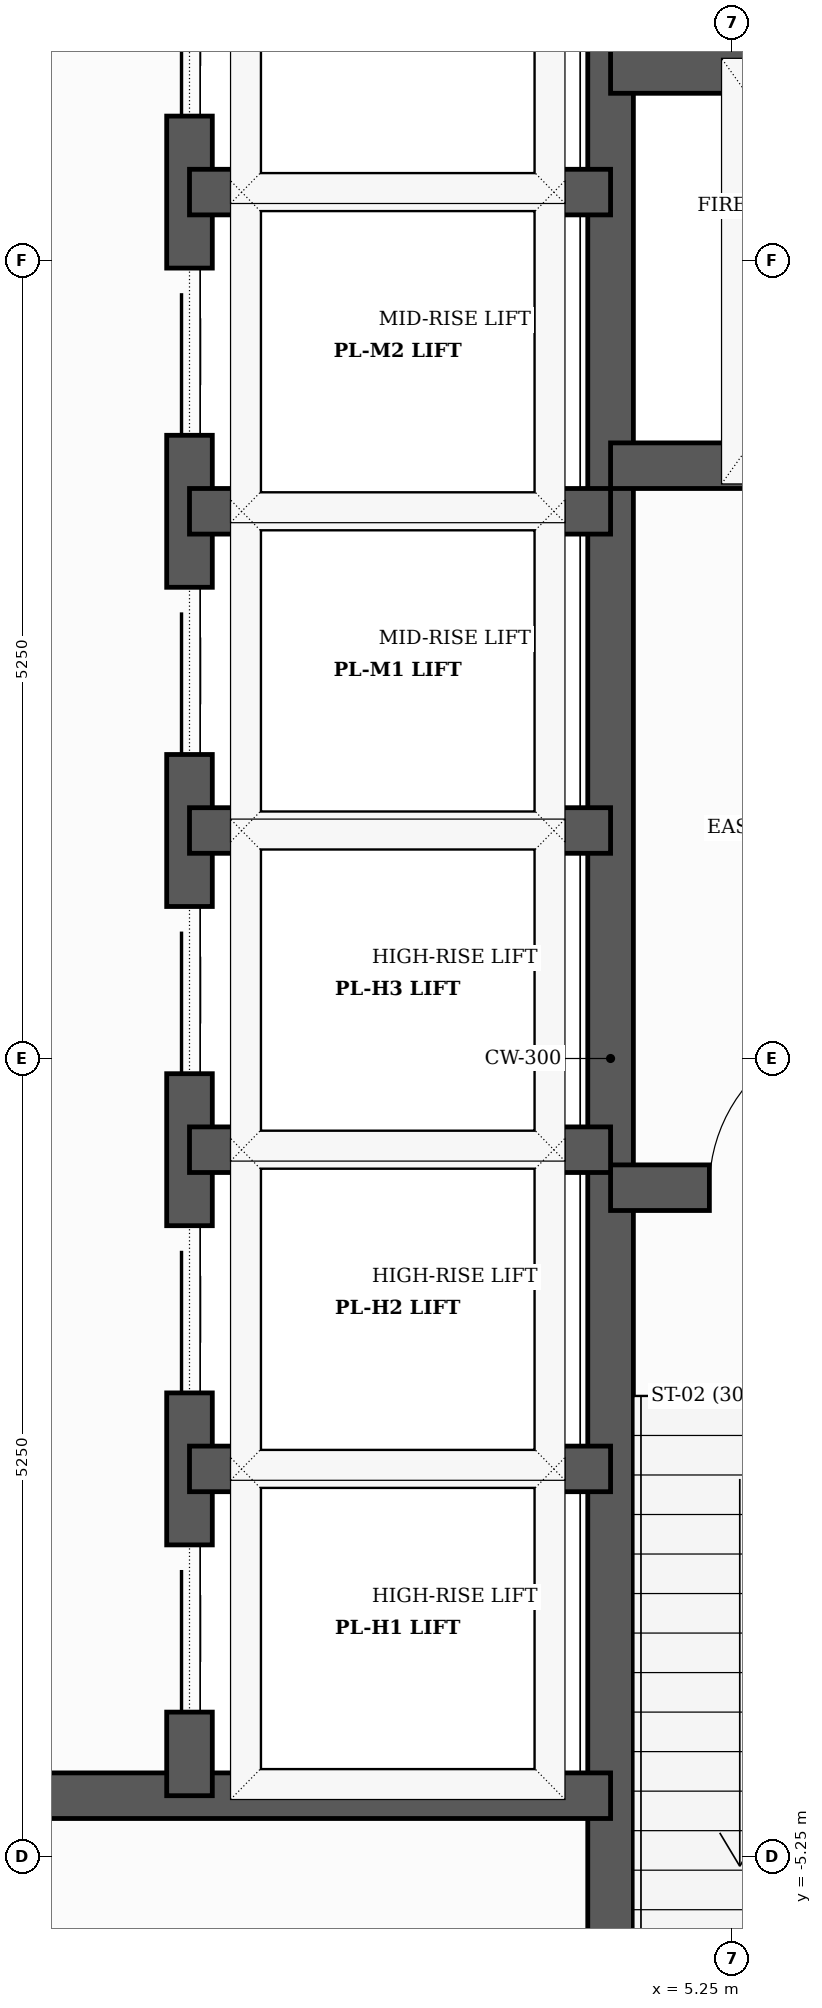
"""IFC4 building model, lengths in metres.
Left out: names, types, materials, properties, quantities, classifications, styles, units other than length and angle.
Written with IfcOpenShell. Run it as: python <this file> out.ifc"""

import sys

from ifc_helpers import new_model, si_unit, direction, frame, frame_2d, origin, place, context, subcontext, project, spatial, rectangle, extrude, element, fill, save


model = new_model("IFC4")
c1 = context("Model", 3, precision=1e-05, world=origin(), true_north=direction((0.0, 1.0)))
c2 = subcontext(c1, "Body", "Model", "MODEL_VIEW")
j1 = project(units=[si_unit("LENGTHUNIT", "METRE"), si_unit("PLANEANGLEUNIT", "RADIAN")], contexts=[c1])
p1 = place(None, origin())
s1 = spatial("IfcSite", under=j1, at=p1, CompositionType="ELEMENT")
p2 = place(p1, origin())
s2 = spatial("IfcBuilding", under=s1, at=p2, CompositionType="ELEMENT")
p3 = place(p2, frame((0.0, 0.0, 85.2)))
s3 = spatial("IfcBuildingStorey", under=s2, at=p3, CompositionType="ELEMENT", Elevation=85.2)
p4 = place(p3, frame((30.436, -3.14, 0.0), z_axis=(0.0, 0.0, 1.0), x_axis=(-0.743144101168, 0.669131410785, 0.0)))
e1 = element("IfcWall", 1, at=p4, inside=s3, PredefinedType="SOLIDWALL", context=c2, shape_type="SweptSolid", body=[
    extrude(rectangle(XDim=49.44, YDim=0.22, at=frame_2d((24.72, 0.0))), origin(), (0.0, 0.0, 1.0), 4.4),
])
p5 = place(p3, frame((4.45, -7.79, 0.0), z_axis=(0.0, 0.0, 1.0), x_axis=(0.0, 1.0, 0.0)))
e2 = element("IfcWall", 2, at=p5, inside=s3, PredefinedType="SHEAR", context=c2, shape_type="SweptSolid", body=[
    extrude(rectangle(XDim=15.58, YDim=0.3, at=frame_2d((7.79, 0.0))), origin(), (0.0, 0.0, 1.0), 4.9),
])
p6 = place(p3, frame((4.45, -0.85, 0.0), z_axis=(0.0, 0.0, 1.0), x_axis=(1.0, 0.0, 0.0)))
e3 = element("IfcWall", 3, at=p6, inside=s3, PredefinedType="SHEAR", context=c2, shape_type="SweptSolid", body=[
    extrude(rectangle(XDim=3.34, YDim=0.3, at=frame_2d((1.67, 0.0))), origin(), (0.0, 0.0, 1.0), 4.9),
])
p7 = place(p6, frame((0.65, 0.0, 0.0)))
e4 = element("IfcOpeningElement", 4, at=p7, cuts=e3, PredefinedType="OPENING", context=c2, shape_type="SweptSolid", body=[
    extrude(rectangle(XDim=1.05, YDim=2.15, at=frame_2d((0.525, 1.075))), frame((0.0, 0.16, 0.0), z_axis=(0.0, -1.0, 0.0), x_axis=(1.0, 0.0, 0.0)), (0.0, 0.0, 1.0), 0.32),
])
p8 = place(p3, frame((4.45, 3.9, 0.0), z_axis=(0.0, 0.0, 1.0), x_axis=(1.0, 0.0, 0.0)))
e5 = element("IfcWall", 5, at=p8, inside=s3, PredefinedType="SHEAR", context=c2, shape_type="SweptSolid", body=[
    extrude(rectangle(XDim=3.34, YDim=0.3, at=frame_2d((1.67, 0.0))), origin(), (0.0, 0.0, 1.0), 4.9),
])
p9 = place(p8, frame((1.18, 0.0, 0.0)))
e6 = element("IfcOpeningElement", 6, at=p9, cuts=e5, PredefinedType="OPENING", context=c2, shape_type="SweptSolid", body=[
    extrude(rectangle(XDim=1.1, YDim=2.1, at=frame_2d((0.55, 1.05))), frame((0.0, 0.16, 0.0), z_axis=(0.0, -1.0, 0.0), x_axis=(1.0, 0.0, 0.0)), (0.0, 0.0, 1.0), 0.32),
])
p10 = place(p3, frame((4.45, 6.5, 0.0), z_axis=(0.0, 0.0, 1.0), x_axis=(1.0, 0.0, 0.0)))
e7 = element("IfcWall", 7, at=p10, inside=s3, PredefinedType="SHEAR", context=c2, shape_type="SweptSolid", body=[
    extrude(rectangle(XDim=3.34, YDim=0.3, at=frame_2d((1.67, 0.0))), origin(), (0.0, 0.0, 1.0), 4.9),
])
p11 = place(p3, frame((-4.45, -4.85, 0.0), z_axis=(0.0, 0.0, 1.0), x_axis=(1.0, 0.0, 0.0)))
e8 = element("IfcWall", 8, at=p11, inside=s3, PredefinedType="SHEAR", context=c2, shape_type="SweptSolid", body=[
    extrude(rectangle(XDim=8.9, YDim=0.3, at=frame_2d((4.45, 0.0))), origin(), (0.0, 0.0, 1.0), 4.9),
])
p12 = place(p3, frame((1.68, -4.85, 0.0), z_axis=(0.0, 0.0, 1.0), x_axis=(0.0, 1.0, 0.0)))
e9 = element("IfcWall", 9, at=p12, inside=s3, PredefinedType="SHEAR", context=c2, shape_type="SweptSolid", body=[
    extrude(rectangle(XDim=12.64, YDim=0.3, at=frame_2d((6.32, 0.0))), origin(), (0.0, 0.0, 1.0), 4.9),
])
p13 = place(p12, frame((0.55, 0.0, 0.0)))
e10 = element("IfcOpeningElement", 10, at=p13, cuts=e9, PredefinedType="OPENING", context=c2, shape_type="SweptSolid", body=[
    extrude(rectangle(XDim=1.1, YDim=2.1, at=frame_2d((0.55, 1.05))), frame((0.0, 0.16, 0.0), z_axis=(0.0, -1.0, 0.0), x_axis=(1.0, 0.0, 0.0)), (0.0, 0.0, 1.0), 0.32),
])
p14 = place(p12, frame((2.65, 0.0, 0.0)))
e11 = element("IfcOpeningElement", 11, at=p14, cuts=e9, PredefinedType="OPENING", context=c2, shape_type="SweptSolid", body=[
    extrude(rectangle(XDim=1.1, YDim=2.1, at=frame_2d((0.55, 1.05))), frame((0.0, 0.16, 0.0), z_axis=(0.0, -1.0, 0.0), x_axis=(1.0, 0.0, 0.0)), (0.0, 0.0, 1.0), 0.32),
])
p15 = place(p12, frame((4.75, 0.0, 0.0)))
e12 = element("IfcOpeningElement", 12, at=p15, cuts=e9, PredefinedType="OPENING", context=c2, shape_type="SweptSolid", body=[
    extrude(rectangle(XDim=1.1, YDim=2.1, at=frame_2d((0.55, 1.05))), frame((0.0, 0.16, 0.0), z_axis=(0.0, -1.0, 0.0), x_axis=(1.0, 0.0, 0.0)), (0.0, 0.0, 1.0), 0.32),
])
p16 = place(p12, frame((6.85, 0.0, 0.0)))
e13 = element("IfcOpeningElement", 13, at=p16, cuts=e9, PredefinedType="OPENING", context=c2, shape_type="SweptSolid", body=[
    extrude(rectangle(XDim=1.1, YDim=2.1, at=frame_2d((0.55, 1.05))), frame((0.0, 0.16, 0.0), z_axis=(0.0, -1.0, 0.0), x_axis=(1.0, 0.0, 0.0)), (0.0, 0.0, 1.0), 0.32),
])
p17 = place(p12, frame((8.95, 0.0, 0.0)))
e14 = element("IfcOpeningElement", 14, at=p17, cuts=e9, PredefinedType="OPENING", context=c2, shape_type="SweptSolid", body=[
    extrude(rectangle(XDim=1.1, YDim=2.1, at=frame_2d((0.55, 1.05))), frame((0.0, 0.16, 0.0), z_axis=(0.0, -1.0, 0.0), x_axis=(1.0, 0.0, 0.0)), (0.0, 0.0, 1.0), 0.32),
])
p18 = place(p12, frame((11.05, 0.0, 0.0)))
e15 = element("IfcOpeningElement", 15, at=p18, cuts=e9, PredefinedType="OPENING", context=c2, shape_type="SweptSolid", body=[
    extrude(rectangle(XDim=1.1, YDim=2.1, at=frame_2d((0.55, 1.05))), frame((0.0, 0.16, 0.0), z_axis=(0.0, -1.0, 0.0), x_axis=(1.0, 0.0, 0.0)), (0.0, 0.0, 1.0), 0.32),
])
for number, where, z_axis, x_axis in (
    (16, (1.68, 1.5, 0.0), (0.0, 0.0, 1.0), (1.0, 0.0, 0.0)),
    (17, (1.68, 3.6, 0.0), (0.0, 0.0, 1.0), (1.0, 0.0, 0.0)),
    (18, (1.68, 5.7, 0.0), (0.0, 0.0, 1.0), (1.0, 0.0, 0.0)),
    (19, (1.68, -2.7, 0.0), (0.0, 0.0, 1.0), (1.0, 0.0, 0.0)),
    (20, (1.68, -0.6, 0.0), (0.0, 0.0, 1.0), (1.0, 0.0, 0.0)),
):
    element("IfcWall", number, at=place(p3, frame(where, z_axis=z_axis, x_axis=x_axis)), inside=s3, PredefinedType="SHEAR", context=c2, shape_type="SweptSolid", body=[
        extrude(rectangle(XDim=2.77, YDim=0.3, at=frame_2d((1.385, 0.0))), origin(), (0.0, 0.0, 1.0), 4.9),
    ])
p19 = place(p3, frame((-7.036, 28.85, 0.0), z_axis=(0.0, 0.0, 1.0), x_axis=(0.743144937383, -0.669130482075, 0.0)))
e21 = element("IfcWall", 21, at=p19, inside=s3, PredefinedType="SOLIDWALL", context=c2, shape_type="SweptSolid", body=[
    extrude(rectangle(XDim=49.066, YDim=0.16, at=frame_2d((24.533, 0.0))), origin(), (0.0, 0.0, 1.0), 3.485),
])
p20 = place(p7, origin())
e22 = element("IfcDoor", 22, at=p20, inside=s3, OperationType="SINGLE_SWING_RIGHT", PredefinedType="DOOR", context=c2, shape_type="SweptSolid", body=[
    extrude(rectangle(XDim=1.05, YDim=2.15, at=frame_2d((0.525, 1.075))), frame((0.0, 0.025, 0.0), z_axis=(0.0, -1.0, 0.0), x_axis=(1.0, 0.0, 0.0)), (0.0, 0.0, 1.0), 0.05),
])
fill(e4, e22)
p21 = place(p13, origin())
e23 = element("IfcDoor", 23, at=p21, inside=s3, OperationType="SLIDING_TO_LEFT", PredefinedType="DOOR", context=c2, shape_type="SweptSolid", body=[
    extrude(rectangle(XDim=1.1, YDim=2.1, at=frame_2d((0.55, 1.05))), frame((0.0, 0.025, 0.0), z_axis=(0.0, -1.0, 0.0), x_axis=(1.0, 0.0, 0.0)), (0.0, 0.0, 1.0), 0.05),
])
fill(e10, e23)
p22 = place(p14, origin())
e24 = element("IfcDoor", 24, at=p22, inside=s3, OperationType="SLIDING_TO_LEFT", PredefinedType="DOOR", context=c2, shape_type="SweptSolid", body=[
    extrude(rectangle(XDim=1.1, YDim=2.1, at=frame_2d((0.55, 1.05))), frame((0.0, 0.025, 0.0), z_axis=(0.0, -1.0, 0.0), x_axis=(1.0, 0.0, 0.0)), (0.0, 0.0, 1.0), 0.05),
])
fill(e11, e24)
p23 = place(p15, origin())
e25 = element("IfcDoor", 25, at=p23, inside=s3, OperationType="SLIDING_TO_LEFT", PredefinedType="DOOR", context=c2, shape_type="SweptSolid", body=[
    extrude(rectangle(XDim=1.1, YDim=2.1, at=frame_2d((0.55, 1.05))), frame((0.0, 0.025, 0.0), z_axis=(0.0, -1.0, 0.0), x_axis=(1.0, 0.0, 0.0)), (0.0, 0.0, 1.0), 0.05),
])
fill(e12, e25)
p24 = place(p16, origin())
e26 = element("IfcDoor", 26, at=p24, inside=s3, OperationType="SLIDING_TO_LEFT", PredefinedType="DOOR", context=c2, shape_type="SweptSolid", body=[
    extrude(rectangle(XDim=1.1, YDim=2.1, at=frame_2d((0.55, 1.05))), frame((0.0, 0.025, 0.0), z_axis=(0.0, -1.0, 0.0), x_axis=(1.0, 0.0, 0.0)), (0.0, 0.0, 1.0), 0.05),
])
fill(e13, e26)
p25 = place(p17, origin())
e27 = element("IfcDoor", 27, at=p25, inside=s3, OperationType="SLIDING_TO_LEFT", PredefinedType="DOOR", context=c2, shape_type="SweptSolid", body=[
    extrude(rectangle(XDim=1.1, YDim=2.1, at=frame_2d((0.55, 1.05))), frame((0.0, 0.025, 0.0), z_axis=(0.0, -1.0, 0.0), x_axis=(1.0, 0.0, 0.0)), (0.0, 0.0, 1.0), 0.05),
])
fill(e14, e27)
p26 = place(p18, origin())
e28 = element("IfcDoor", 28, at=p26, inside=s3, OperationType="SLIDING_TO_LEFT", PredefinedType="DOOR", context=c2, shape_type="SweptSolid", body=[
    extrude(rectangle(XDim=1.1, YDim=2.1, at=frame_2d((0.55, 1.05))), frame((0.0, 0.025, 0.0), z_axis=(0.0, -1.0, 0.0), x_axis=(1.0, 0.0, 0.0)), (0.0, 0.0, 1.0), 0.05),
])
fill(e15, e28)
save(model, sys.argv[1])
